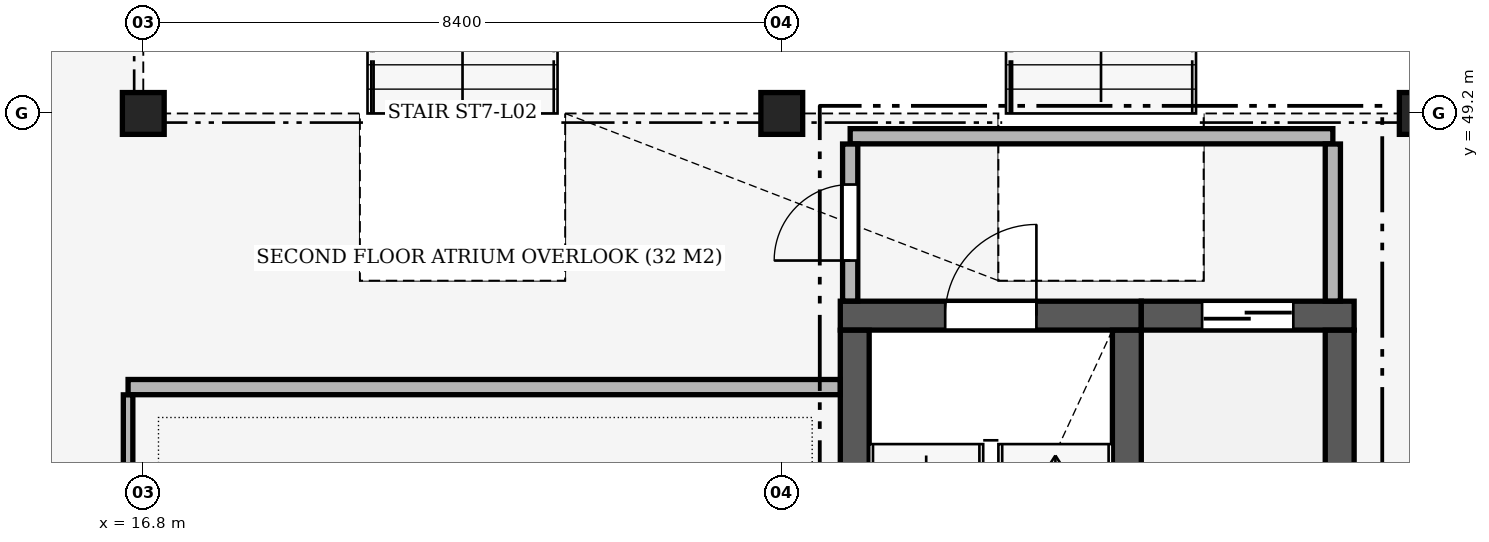
"""IFC4 building model, lengths in metres.
Left out: names, types, materials, properties, quantities, classifications, styles, units other than length and angle.
Written with IfcOpenShell. Run it as: python <this file> out.ifc"""

import sys

from ifc_helpers import new_model, si_unit, direction, frame, frame_2d, origin, origin_2d, place, context, subcontext, project, spatial, rectangle, extrude, element, fill, save


model = new_model("IFC4")
c1 = context("Model", 3, precision=1e-05, world=origin(), true_north=direction((0.0, 1.0)))
c2 = subcontext(c1, "Body", "Model", "MODEL_VIEW")
j1 = project(units=[si_unit("LENGTHUNIT", "METRE"), si_unit("PLANEANGLEUNIT", "RADIAN")], contexts=[c1])
p1 = place(None, origin())
s1 = spatial("IfcSite", under=j1, at=p1, CompositionType="ELEMENT")
p2 = place(p1, origin())
s2 = spatial("IfcBuilding", under=s1, at=p2, CompositionType="ELEMENT")
p3 = place(p2, frame((0.0, 0.0, 10.2)))
s3 = spatial("IfcBuildingStorey", under=s2, at=p3, CompositionType="ELEMENT", Elevation=10.2)
for number, where, z_axis, x_axis in (
    (1, (16.8, 49.2, 0.0), (0.0, 0.0, 1.0), (1.0, 0.0, 0.0)),
    (2, (25.2, 49.2, 0.0), (0.0, 0.0, 1.0), (1.0, 0.0, 0.0)),
    (3, (33.6, 49.2, 0.0), (0.0, 0.0, 1.0), (1.0, 0.0, 0.0)),
):
    element("IfcColumn", number, at=place(p3, frame(where, z_axis=z_axis, x_axis=x_axis)), inside=s3, PredefinedType="COLUMN", context=c2, shape_type="SweptSolid", body=[
        extrude(rectangle(XDim=0.55, YDim=0.55, at=origin_2d()), origin(), (0.0, 0.0, 1.0), 5.1),
    ])
p4 = place(p3, frame((25.97, 46.54, 0.0), z_axis=(0.0, 0.0, 1.0), x_axis=(1.0, 0.0, 0.0)))
e4 = element("IfcWall", 4, at=p4, inside=s3, PredefinedType="SHEAR", context=c2, shape_type="SweptSolid", body=[
    extrude(rectangle(XDim=3.96, YDim=0.38, at=frame_2d((1.98, 0.0))), origin(), (0.0, 0.0, 1.0), 4.82),
])
p5 = place(p4, frame((1.38, 0.0, 0.0)))
e5 = element("IfcOpeningElement", 5, at=p5, cuts=e4, PredefinedType="OPENING", context=c2, shape_type="SweptSolid", body=[
    extrude(rectangle(XDim=1.2, YDim=2.2, at=frame_2d((0.6, 1.1))), frame((0.0, 0.205, 0.0), z_axis=(0.0, -1.0, 0.0), x_axis=(1.0, 0.0, 0.0)), (0.0, 0.0, 1.0), 0.41),
])
for number, where, z_axis, x_axis in (
    (6, (26.16, 39.452, 0.0), (0.0, 0.0, 1.0), (0.0, 1.0, 0.0)),
    (7, (29.74, 39.452, 0.0), (0.0, 0.0, 1.0), (0.0, 1.0, 0.0)),
):
    element("IfcWall", number, at=place(p3, frame(where, z_axis=z_axis, x_axis=x_axis)), inside=s3, PredefinedType="SHEAR", context=c2, shape_type="SweptSolid", body=[
        extrude(rectangle(XDim=6.896, YDim=0.38, at=frame_2d((3.448, 0.0))), origin(), (0.0, 0.0, 1.0), 4.82),
    ])
p6 = place(p3, frame((29.93, 46.54, 0.0), z_axis=(0.0, 0.0, 1.0), x_axis=(1.0, 0.0, 0.0)))
e8 = element("IfcWall", 8, at=p6, inside=s3, PredefinedType="SHEAR", context=c2, shape_type="SweptSolid", body=[
    extrude(rectangle(XDim=2.8, YDim=0.38, at=frame_2d((1.4, 0.0))), origin(), (0.0, 0.0, 1.0), 4.82),
])
p7 = place(p6, frame((0.8, 0.0, 0.0)))
e9 = element("IfcOpeningElement", 9, at=p7, cuts=e8, PredefinedType="OPENING", context=c2, shape_type="SweptSolid", body=[
    extrude(rectangle(XDim=1.2, YDim=2.15, at=frame_2d((0.6, 1.075))), frame((0.0, 0.205, 0.0), z_axis=(0.0, -1.0, 0.0), x_axis=(1.0, 0.0, 0.0)), (0.0, 0.0, 1.0), 0.41),
])
p8 = place(p3, frame((32.54, 43.552, 0.0), z_axis=(0.0, 0.0, 1.0), x_axis=(0.0, 1.0, 0.0)))
e10 = element("IfcWall", 10, at=p8, inside=s3, PredefinedType="SHEAR", context=c2, shape_type="SweptSolid", body=[
    extrude(rectangle(XDim=2.796, YDim=0.38, at=frame_2d((1.398, 0.0))), origin(), (0.0, 0.0, 1.0), 4.82),
])
p9 = place(p3, frame((16.6, 45.6, 0.0), z_axis=(0.0, 0.0, 1.0), x_axis=(1.0, 0.0, 0.0)))
e11 = element("IfcWall", 11, at=p9, inside=s3, PredefinedType="PARTITIONING", context=c2, shape_type="SweptSolid", body=[
    extrude(rectangle(XDim=9.368, YDim=0.2, at=frame_2d((4.684, 0.0))), origin(), (0.0, 0.0, 1.0), 4.12),
])
p10 = place(p3, frame((26.1, 48.9, 0.0), z_axis=(0.0, 0.0, 1.0), x_axis=(1.0, 0.0, 0.0)))
e12 = element("IfcWall", 12, at=p10, inside=s3, PredefinedType="PARTITIONING", context=c2, shape_type="SweptSolid", body=[
    extrude(rectangle(XDim=6.35, YDim=0.2, at=frame_2d((3.175, 0.0))), origin(), (0.0, 0.0, 1.0), 4.12),
])
p11 = place(p3, frame((16.6, 35.4, 0.0), z_axis=(0.0, 0.0, 1.0), x_axis=(0.0, 1.0, 0.0)))
e13 = element("IfcWall", 13, at=p11, inside=s3, PredefinedType="PARTITIONING", context=c2, shape_type="SweptSolid", body=[
    extrude(rectangle(XDim=10.098, YDim=0.125, at=frame_2d((5.049, 0.0))), origin(), (0.0, 0.0, 1.0), 4.12),
])
p12 = place(p11, frame((2.249, 0.0, 0.0)))
e14 = element("IfcOpeningElement", 14, at=p12, cuts=e13, PredefinedType="OPENING", context=c2, shape_type="SweptSolid", body=[
    extrude(rectangle(XDim=1.6, YDim=2.3, at=frame_2d((0.8, 1.15))), frame((0.0, 0.077, 0.0), z_axis=(0.0, -1.0, 0.0), x_axis=(1.0, 0.0, 0.0)), (0.0, 0.0, 1.0), 0.155),
])
p13 = place(p3, frame((26.1, 46.732, 0.0), z_axis=(0.0, 0.0, 1.0), x_axis=(0.0, 1.0, 0.0)))
e15 = element("IfcWall", 15, at=p13, inside=s3, PredefinedType="PARTITIONING", context=c2, shape_type="SweptSolid", body=[
    extrude(rectangle(XDim=2.066, YDim=0.2, at=frame_2d((1.033, 0.0))), origin(), (0.0, 0.0, 1.0), 4.82),
])
p14 = place(p13, frame((0.533, 0.0, 0.0)))
e16 = element("IfcOpeningElement", 16, at=p14, cuts=e15, PredefinedType="OPENING", context=c2, shape_type="SweptSolid", body=[
    extrude(rectangle(XDim=1.0, YDim=2.1, at=frame_2d((0.5, 1.05))), frame((0.0, 0.115, 0.0), z_axis=(0.0, -1.0, 0.0), x_axis=(1.0, 0.0, 0.0)), (0.0, 0.0, 1.0), 0.23),
])
p15 = place(p3, frame((32.45, 46.732, 0.0), z_axis=(0.0, 0.0, 1.0), x_axis=(0.0, 1.0, 0.0)))
e17 = element("IfcWall", 17, at=p15, inside=s3, PredefinedType="PARTITIONING", context=c2, shape_type="SweptSolid", body=[
    extrude(rectangle(XDim=2.066, YDim=0.2, at=frame_2d((1.033, 0.0))), origin(), (0.0, 0.0, 1.0), 4.82),
])
p16 = place(p5, origin())
e18 = element("IfcDoor", 18, at=p16, inside=s3, OperationType="SINGLE_SWING_RIGHT", PredefinedType="DOOR", context=c2, shape_type="SweptSolid", body=[
    extrude(rectangle(XDim=1.2, YDim=2.2, at=frame_2d((0.6, 1.1))), frame((0.0, 0.025, 0.0), z_axis=(0.0, -1.0, 0.0), x_axis=(1.0, 0.0, 0.0)), (0.0, 0.0, 1.0), 0.05),
])
fill(e5, e18)
p17 = place(p7, origin())
e19 = element("IfcDoor", 19, at=p17, inside=s3, OperationType="DOUBLE_DOOR_SLIDING", PredefinedType="DOOR", context=c2, shape_type="SweptSolid", body=[
    extrude(rectangle(XDim=1.2, YDim=2.15, at=frame_2d((0.6, 1.075))), frame((0.0, 0.025, 0.0), z_axis=(0.0, -1.0, 0.0), x_axis=(1.0, 0.0, 0.0)), (0.0, 0.0, 1.0), 0.05),
])
fill(e9, e19)
p18 = place(p14, origin())
e20 = element("IfcDoor", 20, at=p18, inside=s3, OperationType="SINGLE_SWING_LEFT", PredefinedType="DOOR", context=c2, shape_type="SweptSolid", body=[
    extrude(rectangle(XDim=1.0, YDim=2.1, at=frame_2d((0.5, 1.05))), frame((0.0, 0.025, 0.0), z_axis=(0.0, -1.0, 0.0), x_axis=(1.0, 0.0, 0.0)), (0.0, 0.0, 1.0), 0.05),
])
fill(e16, e20)
save(model, sys.argv[1])
